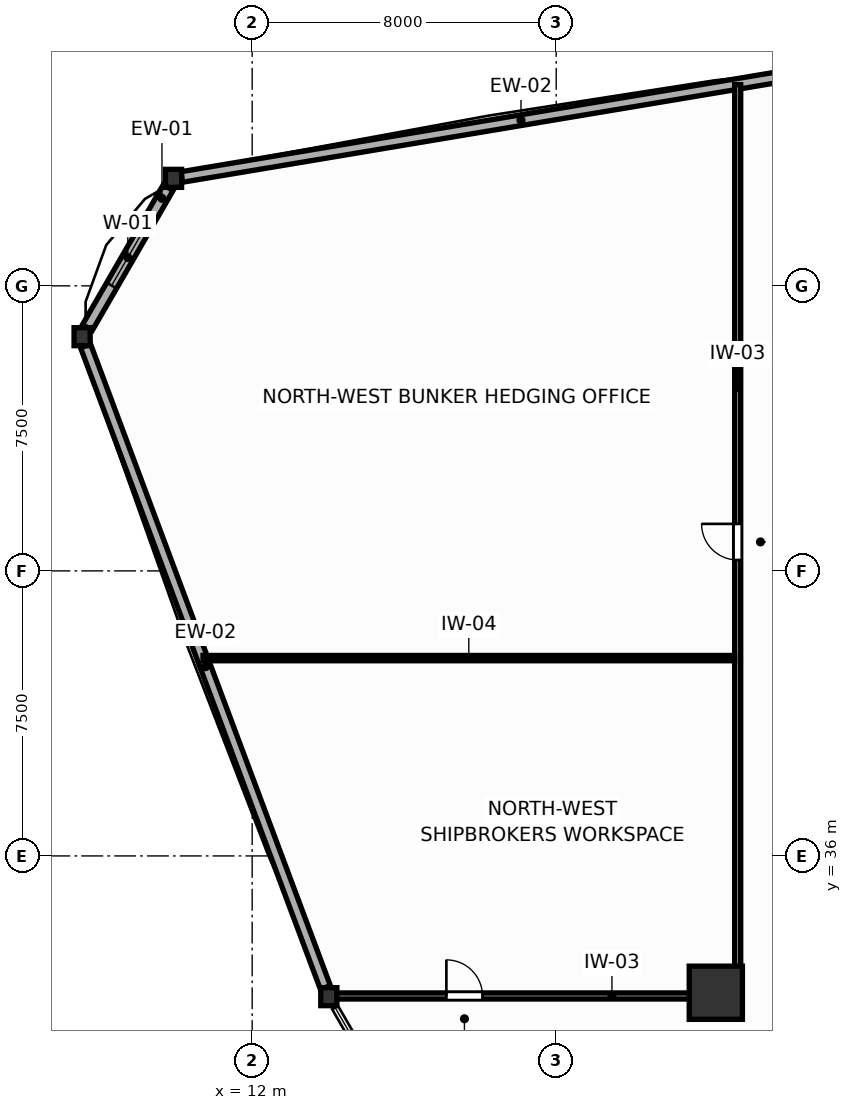
"""IFC4 building model, lengths in metres.
Left out: names, types, materials, properties, quantities, classifications, styles, units other than length and angle.
Written with IfcOpenShell. Run it as: python <this file> out.ifc"""

import sys

from ifc_helpers import new_model, si_unit, direction, frame, frame_2d, origin, origin_2d, place, context, subcontext, project, spatial, rectangle, i_section, extrude, source, transform, mapped, element, fill, save


model = new_model("IFC4")
c1 = context("Model", 3, precision=1e-05, world=origin(), true_north=direction((0.0, 1.0)))
c2 = subcontext(c1, "Body", "Model", "MODEL_VIEW")
j1 = project(units=[si_unit("LENGTHUNIT", "METRE"), si_unit("PLANEANGLEUNIT", "RADIAN")], contexts=[c1])
p1 = place(None, origin())
s1 = spatial("IfcSite", under=j1, at=p1, CompositionType="ELEMENT")
p2 = place(p1, origin())
s2 = spatial("IfcBuilding", under=s1, at=p2, CompositionType="ELEMENT")
p3 = place(p2, frame((0.0, 0.0, 55.2)))
s3 = spatial("IfcBuildingStorey", under=s2, at=p3, CompositionType="ELEMENT", Elevation=55.2)
m1 = source(origin(), c2, "Body", "SweptSolid", [
    extrude(rectangle(XDim=1.4, YDim=1.4, at=origin_2d()), origin(), (0.0, 0.0, 1.0), 3.9),
])
p4 = place(p3, frame((24.2, 32.4, 0.0), z_axis=(0.0, 0.0, 1.0), x_axis=(1.0, 0.0, 0.0)))
e1 = element("IfcColumn", 1, at=p4, inside=s3, PredefinedType="COLUMN", context=c2, shape_type="MappedRepresentation", body=[
    mapped(m1, transform((0.0, 0.0, 0.0), scale=1.0)),
])
m2 = source(origin(), c2, "Body", "SweptSolid", [
    extrude(i_section(OverallWidth=0.424, OverallDepth=0.474, WebThickness=0.045, FlangeThickness=0.072, FilletRadius=0.015, at=origin_2d()), origin(), (0.0, 0.0, 1.0), 3.9),
])
for number, where, z_axis, x_axis in (
    (2, (9.931, 53.829, 0.0), (0.0, 0.0, 1.0), (1.0, 0.0, 0.0)),
    (3, (7.525, 49.662, 0.0), (0.0, 0.0, 1.0), (1.0, 0.0, 0.0)),
    (4, (14.017, 32.297, 0.0), (0.0, 0.0, 1.0), (1.0, 0.0, 0.0)),
):
    element("IfcColumn", number, at=place(p3, frame(where, z_axis=z_axis, x_axis=x_axis)), inside=s3, PredefinedType="COLUMN", context=c2, shape_type="MappedRepresentation", body=[
        mapped(m2, transform((0.0, 0.0, 0.0), scale=1.0)),
    ])
p5 = place(p3, frame((27.998, 56.853, 0.0), z_axis=(0.0, 0.0, 1.0), x_axis=(-0.986273350987, -0.165120795577, 0.0)))
e5 = element("IfcWall", 5, at=p5, inside=s3, PredefinedType="SOLIDWALL", context=c2, shape_type="SweptSolid", body=[
    extrude(rectangle(XDim=18.099, YDim=0.28, at=frame_2d((9.05, 0.0))), origin(), (0.0, 0.0, 1.0), 3.11),
])
p6 = place(p3, frame((9.791, 53.586, 0.0), z_axis=(0.0, 0.0, 1.0), x_axis=(-0.500017365573, -0.866015377534, 0.0)))
e6 = element("IfcWall", 6, at=p6, inside=s3, PredefinedType="SOLIDWALL", context=c2, shape_type="SweptSolid", body=[
    extrude(rectangle(XDim=4.252, YDim=0.3, at=frame_2d((2.126, 0.0))), origin(), (0.0, 0.0, 1.0), 3.11),
])
p7 = place(p6, frame((1.276, 0.0, 0.75)))
e7 = element("IfcOpeningElement", 7, at=p7, cuts=e6, PredefinedType="OPENING", context=c2, shape_type="SweptSolid", body=[
    extrude(rectangle(XDim=1.7, YDim=1.75, at=frame_2d((0.85, 0.875))), frame((0.0, 0.16, 0.0), z_axis=(0.0, -1.0, 0.0), x_axis=(1.0, 0.0, 0.0)), (0.0, 0.0, 1.0), 0.32),
])
p8 = place(p3, frame((7.616, 49.42, 0.0), z_axis=(0.0, 0.0, 1.0), x_axis=(0.350140465982, -0.936697205121, 0.0)))
e8 = element("IfcWall", 8, at=p8, inside=s3, PredefinedType="SOLIDWALL", context=c2, shape_type="SweptSolid", body=[
    extrude(rectangle(XDim=18.022, YDim=0.28, at=frame_2d((9.011, 0.0))), origin(), (0.0, 0.0, 1.0), 3.11),
])
p9 = place(p3, frame((24.775, 32.31, 0.0), z_axis=(0.0, 0.0, 1.0), x_axis=(0.0, 1.0, 0.0)))
e9 = element("IfcWall", 9, at=p9, inside=s3, PredefinedType="PARTITIONING", context=c2, shape_type="SweptSolid", body=[
    extrude(rectangle(XDim=23.984, YDim=0.16, at=frame_2d((11.992, 0.0))), origin(), (0.0, 0.0, 1.0), 3.56),
])
p10 = place(p9, frame((11.477, 0.0, 0.0)))
e10 = element("IfcOpeningElement", 10, at=p10, cuts=e9, PredefinedType="OPENING", context=c2, shape_type="SweptSolid", body=[
    extrude(rectangle(XDim=0.95, YDim=2.05, at=frame_2d((0.475, 1.025))), frame((0.0, 0.09, 0.0), z_axis=(0.0, -1.0, 0.0), x_axis=(1.0, 0.0, 0.0)), (0.0, 0.0, 1.0), 0.18),
])
p11 = place(p3, frame((14.03, 32.315, 0.0), z_axis=(0.0, 0.0, 1.0), x_axis=(1.0, 0.0, 0.0)))
e11 = element("IfcWall", 11, at=p11, inside=s3, PredefinedType="PARTITIONING", context=c2, shape_type="SweptSolid", body=[
    extrude(rectangle(XDim=10.663, YDim=0.16, at=frame_2d((5.332, 0.0))), origin(), (0.0, 0.0, 1.0), 3.06),
])
p12 = place(p11, frame((3.08, 0.0, 0.0)))
e12 = element("IfcOpeningElement", 12, at=p12, cuts=e11, PredefinedType="OPENING", context=c2, shape_type="SweptSolid", body=[
    extrude(rectangle(XDim=0.95, YDim=2.05, at=frame_2d((0.475, 1.025))), frame((0.0, 0.09, 0.0), z_axis=(0.0, -1.0, 0.0), x_axis=(1.0, 0.0, 0.0)), (0.0, 0.0, 1.0), 0.18),
])
p13 = place(p3, frame((10.707, 41.205, 0.0), z_axis=(0.0, 0.0, 1.0), x_axis=(1.0, 0.0, 0.0)))
e13 = element("IfcWall", 13, at=p13, inside=s3, PredefinedType="PARTITIONING", context=c2, shape_type="SweptSolid", body=[
    extrude(rectangle(XDim=13.986, YDim=0.14, at=frame_2d((6.993, 0.0))), origin(), (0.0, 0.0, 1.0), 3.56),
])
p14 = place(p7, origin())
e14 = element("IfcWindow", 14, at=p14, inside=s3, PartitioningType="SINGLE_PANEL", PredefinedType="WINDOW", context=c2, shape_type="SweptSolid", body=[
    extrude(rectangle(XDim=1.7, YDim=1.75, at=frame_2d((0.85, 0.875))), frame((0.0, 0.03, 0.0), z_axis=(0.0, -1.0, 0.0), x_axis=(1.0, 0.0, 0.0)), (0.0, 0.0, 1.0), 0.06),
])
fill(e7, e14)
p15 = place(p10, origin())
e15 = element("IfcDoor", 15, at=p15, inside=s3, OperationType="SINGLE_SWING_RIGHT", PredefinedType="DOOR", context=c2, shape_type="SweptSolid", body=[
    extrude(rectangle(XDim=0.95, YDim=2.05, at=frame_2d((0.475, 1.025))), frame((0.0, 0.025, 0.0), z_axis=(0.0, -1.0, 0.0), x_axis=(1.0, 0.0, 0.0)), (0.0, 0.0, 1.0), 0.05),
])
fill(e10, e15)
p16 = place(p12, origin())
e16 = element("IfcDoor", 16, at=p16, inside=s3, OperationType="SINGLE_SWING_LEFT", PredefinedType="DOOR", context=c2, shape_type="SweptSolid", body=[
    extrude(rectangle(XDim=0.95, YDim=2.05, at=frame_2d((0.475, 1.025))), frame((0.0, 0.025, 0.0), z_axis=(0.0, -1.0, 0.0), x_axis=(1.0, 0.0, 0.0)), (0.0, 0.0, 1.0), 0.05),
])
fill(e12, e16)
save(model, sys.argv[1])
